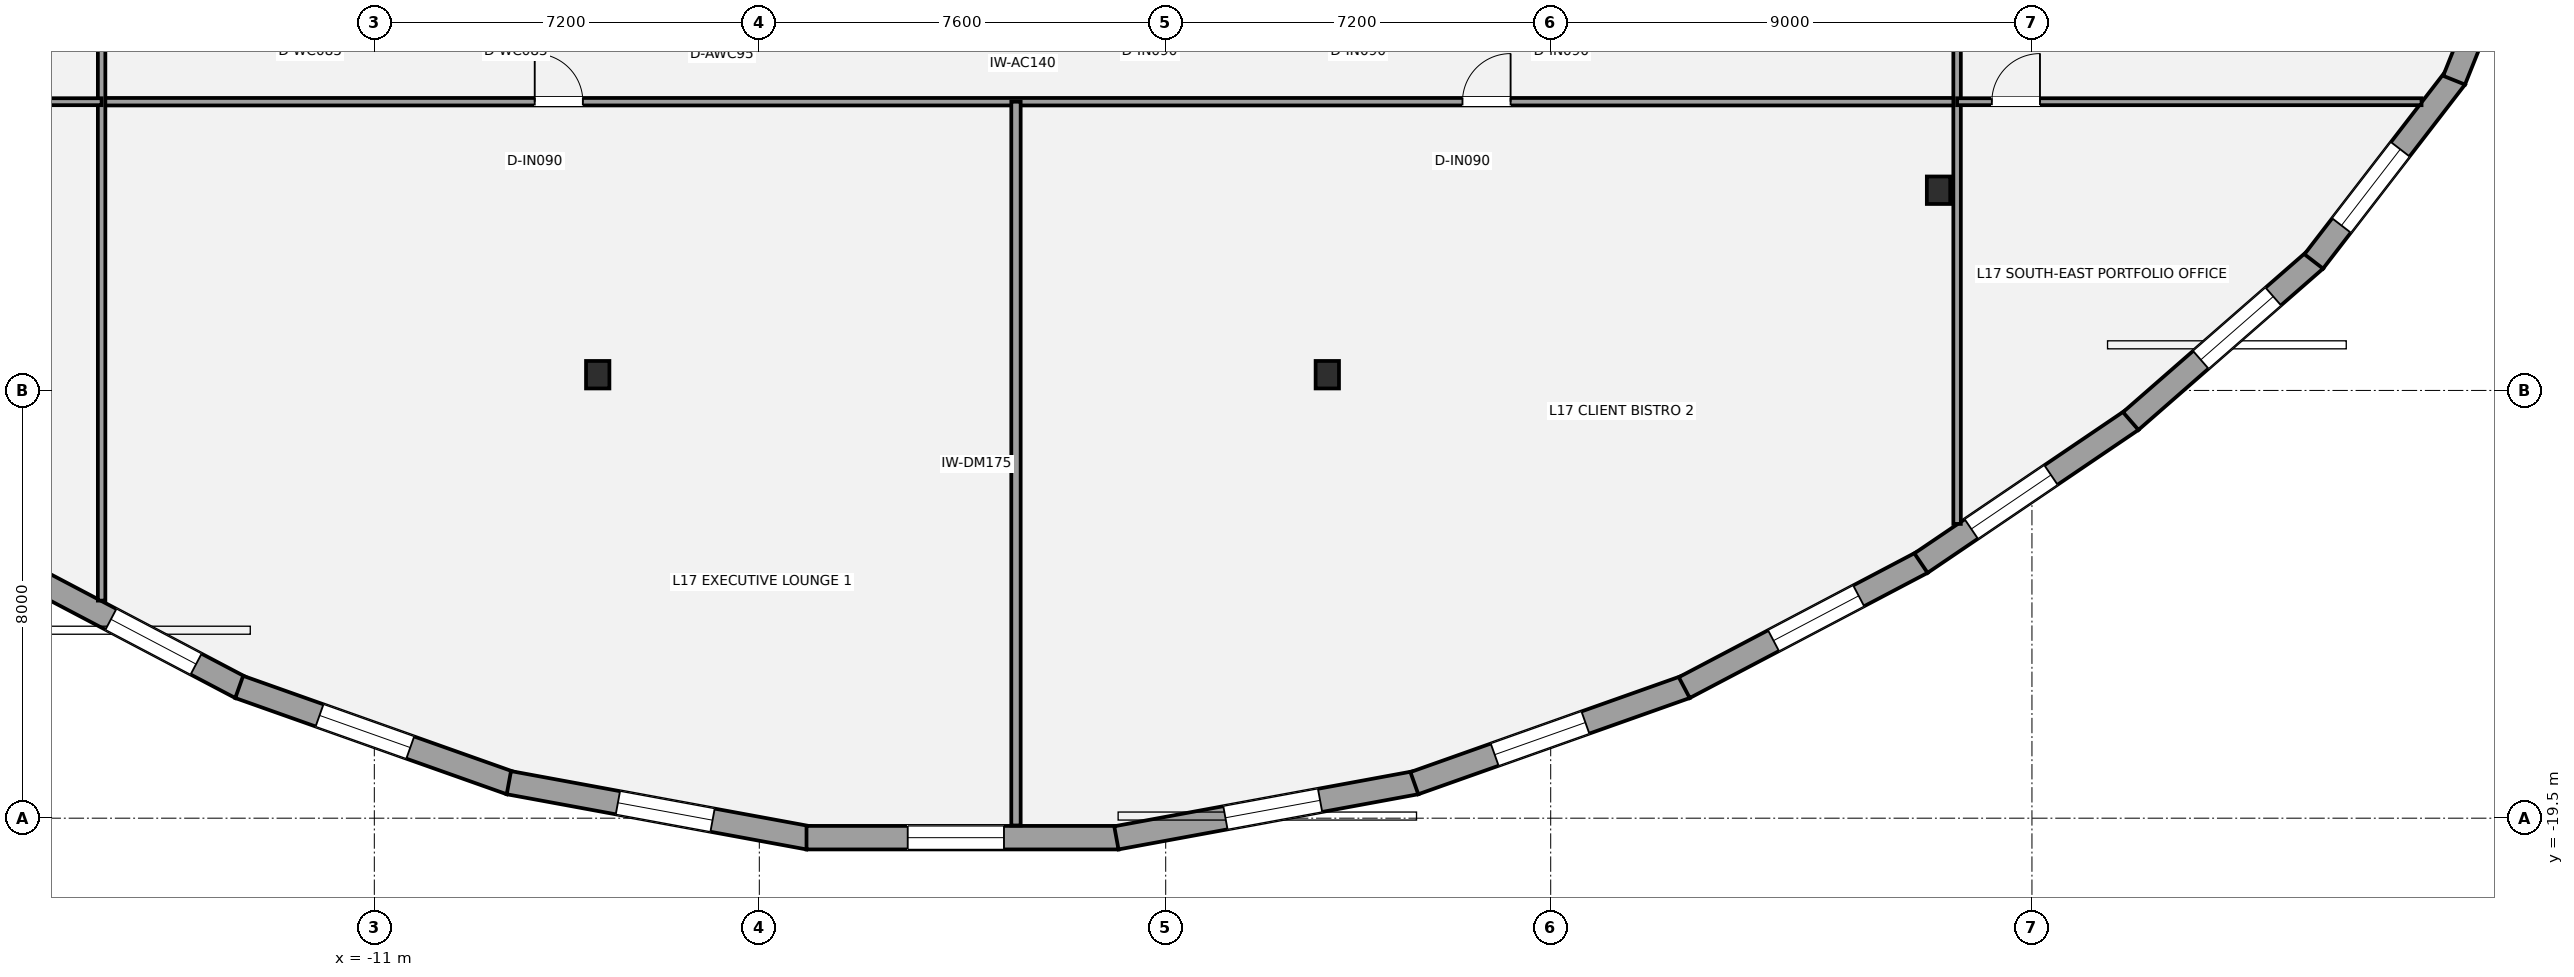
"""IFC4 building model, lengths in metres.
Left out: names, types, materials, properties, quantities, classifications, styles, units other than length and angle.
Written with IfcOpenShell. Run it as: python <this file> out.ifc"""

import sys

from ifc_helpers import new_model, si_unit, direction, frame, frame_2d, origin, origin_2d, place, context, subcontext, project, spatial, rectangle, i_section, extrude, element, fill, save


model = new_model("IFC4")
c1 = context("Model", 3, precision=1e-05, world=origin(), true_north=direction((0.0, 1.0)))
c2 = subcontext(c1, "Body", "Model", "MODEL_VIEW")
j1 = project(units=[si_unit("LENGTHUNIT", "METRE"), si_unit("PLANEANGLEUNIT", "RADIAN")], contexts=[c1])
p1 = place(None, origin())
s1 = spatial("IfcSite", under=j1, at=p1, CompositionType="ELEMENT")
p2 = place(p1, origin())
s2 = spatial("IfcBuilding", under=s1, at=p2, CompositionType="ELEMENT")
p3 = place(p2, frame((0.0, 0.0, 66.6)))
s3 = spatial("IfcBuildingStorey", under=s2, at=p3, CompositionType="ELEMENT", Elevation=66.6)
for number, where, z_axis, x_axis in (
    (1, (-6.822, -11.206, 0.0), (0.0, 0.0, 1.0), (1.0, 0.0, 0.0)),
    (2, (6.822, -11.206, 0.0), (0.0, 0.0, 1.0), (1.0, 0.0, 0.0)),
    (3, (18.253, -7.756, 0.0), (0.0, 0.0, 1.0), (1.0, 0.0, 0.0)),
):
    element("IfcColumn", number, at=place(p3, frame(where, z_axis=z_axis, x_axis=x_axis)), inside=s3, PredefinedType="COLUMN", context=c2, shape_type="SweptSolid", body=[
        extrude(i_section(OverallWidth=0.437, OverallDepth=0.514, WebThickness=0.061, FlangeThickness=0.097, at=origin_2d()), origin(), (0.0, 0.0, 1.0), 3.6),
    ])
p4 = place(p3, frame((-13.498, -17.058, 0.0), z_axis=(0.0, 0.0, 1.0), x_axis=(-0.884937186938, 0.465710398395, 0.0)))
e4 = element("IfcWall", 4, at=p4, inside=s3, PredefinedType="STANDARD", context=c2, shape_type="SweptSolid", body=[
    extrude(rectangle(XDim=5.026, YDim=0.44, at=frame_2d((2.513, 0.0))), origin(), (0.0, 0.0, 1.0), 2.529),
])
p5 = place(p4, frame((0.944, 0.0, 0.65)))
e5 = element("IfcOpeningElement", 5, at=p5, cuts=e4, PredefinedType="OPENING", context=c2, shape_type="SweptSolid", body=[
    extrude(rectangle(XDim=1.8, YDim=1.7, at=frame_2d((0.9, 0.85))), frame((0.0, 0.23, 0.0), z_axis=(0.0, -1.0, 0.0), x_axis=(1.0, 0.0, 0.0)), (0.0, 0.0, 1.0), 0.46),
])
p6 = place(p3, frame((-8.45, -18.845, 0.0), z_axis=(0.0, 0.0, 1.0), x_axis=(-0.942515730584, 0.334161783575, 0.0)))
e6 = element("IfcWall", 6, at=p6, inside=s3, PredefinedType="STANDARD", context=c2, shape_type="SweptSolid", body=[
    extrude(rectangle(XDim=5.386, YDim=0.44, at=frame_2d((2.693, 0.0))), origin(), (0.0, 0.0, 1.0), 2.529),
])
p7 = place(p6, frame((1.992, 0.0, 0.65)))
e7 = element("IfcOpeningElement", 7, at=p7, cuts=e6, PredefinedType="OPENING", context=c2, shape_type="SweptSolid", body=[
    extrude(rectangle(XDim=1.8, YDim=1.7, at=frame_2d((0.9, 0.85))), frame((0.0, 0.23, 0.0), z_axis=(0.0, -1.0, 0.0), x_axis=(1.0, 0.0, 0.0)), (0.0, 0.0, 1.0), 0.46),
])
p8 = place(p3, frame((-2.878, -19.868, 0.0), z_axis=(0.0, 0.0, 1.0), x_axis=(-0.983468646836, 0.181078493177, 0.0)))
e8 = element("IfcWall", 8, at=p8, inside=s3, PredefinedType="STANDARD", context=c2, shape_type="SweptSolid", body=[
    extrude(rectangle(XDim=5.7, YDim=0.44, at=frame_2d((2.85, 0.0))), origin(), (0.0, 0.0, 1.0), 2.529),
])
p9 = place(p8, frame((1.827, 0.0, 0.65)))
e9 = element("IfcOpeningElement", 9, at=p9, cuts=e8, PredefinedType="OPENING", context=c2, shape_type="SweptSolid", body=[
    extrude(rectangle(XDim=1.8, YDim=1.7, at=frame_2d((0.9, 0.85))), frame((0.0, 0.23, 0.0), z_axis=(0.0, -1.0, 0.0), x_axis=(1.0, 0.0, 0.0)), (0.0, 0.0, 1.0), 0.46),
])
p10 = place(p3, frame((2.917, -19.865, 0.0), z_axis=(0.0, 0.0, 1.0), x_axis=(-1.0, 0.0, 0.0)))
e10 = element("IfcWall", 10, at=p10, inside=s3, PredefinedType="STANDARD", context=c2, shape_type="SweptSolid", body=[
    extrude(rectangle(XDim=5.835, YDim=0.44, at=frame_2d((2.917, 0.0))), origin(), (0.0, 0.0, 1.0), 2.529),
])
p11 = place(p10, frame((2.142, 0.0, 0.65)))
e11 = element("IfcOpeningElement", 11, at=p11, cuts=e10, PredefinedType="OPENING", context=c2, shape_type="SweptSolid", body=[
    extrude(rectangle(XDim=1.8, YDim=1.7, at=frame_2d((0.9, 0.85))), frame((0.0, 0.23, 0.0), z_axis=(0.0, -1.0, 0.0), x_axis=(1.0, 0.0, 0.0)), (0.0, 0.0, 1.0), 0.46),
])
p12 = place(p3, frame((8.484, -18.836, 0.0), z_axis=(0.0, 0.0, 1.0), x_axis=(-0.983468646836, -0.181078493177, 0.0)))
e12 = element("IfcWall", 12, at=p12, inside=s3, PredefinedType="STANDARD", context=c2, shape_type="SweptSolid", body=[
    extrude(rectangle(XDim=5.7, YDim=0.44, at=frame_2d((2.85, 0.0))), origin(), (0.0, 0.0, 1.0), 2.529),
])
p13 = place(p12, frame((1.827, 0.0, 0.65)))
e13 = element("IfcOpeningElement", 13, at=p13, cuts=e12, PredefinedType="OPENING", context=c2, shape_type="SweptSolid", body=[
    extrude(rectangle(XDim=1.8, YDim=1.7, at=frame_2d((0.9, 0.85))), frame((0.0, 0.23, 0.0), z_axis=(0.0, -1.0, 0.0), x_axis=(1.0, 0.0, 0.0)), (0.0, 0.0, 1.0), 0.46),
])
p14 = place(p3, frame((13.527, -17.045, 0.0), z_axis=(0.0, 0.0, 1.0), x_axis=(-0.942515730584, -0.334161783575, 0.0)))
e14 = element("IfcWall", 14, at=p14, inside=s3, PredefinedType="STANDARD", context=c2, shape_type="SweptSolid", body=[
    extrude(rectangle(XDim=5.386, YDim=0.44, at=frame_2d((2.693, 0.0))), origin(), (0.0, 0.0, 1.0), 2.529),
])
p15 = place(p14, frame((1.992, 0.0, 0.65)))
e15 = element("IfcOpeningElement", 15, at=p15, cuts=e14, PredefinedType="OPENING", context=c2, shape_type="SweptSolid", body=[
    extrude(rectangle(XDim=1.8, YDim=1.7, at=frame_2d((0.9, 0.85))), frame((0.0, 0.23, 0.0), z_axis=(0.0, -1.0, 0.0), x_axis=(1.0, 0.0, 0.0)), (0.0, 0.0, 1.0), 0.46),
])
p16 = place(p3, frame((17.946, -14.717, 0.0), z_axis=(0.0, 0.0, 1.0), x_axis=(-0.884937186938, -0.465710398395, 0.0)))
e16 = element("IfcWall", 16, at=p16, inside=s3, PredefinedType="STANDARD", context=c2, shape_type="SweptSolid", body=[
    extrude(rectangle(XDim=5.026, YDim=0.44, at=frame_2d((2.513, 0.0))), origin(), (0.0, 0.0, 1.0), 2.529),
])
p17 = place(p16, frame((1.341, 0.0, 0.65)))
e17 = element("IfcOpeningElement", 17, at=p17, cuts=e16, PredefinedType="OPENING", context=c2, shape_type="SweptSolid", body=[
    extrude(rectangle(XDim=1.8, YDim=1.7, at=frame_2d((0.9, 0.85))), frame((0.0, 0.23, 0.0), z_axis=(0.0, -1.0, 0.0), x_axis=(1.0, 0.0, 0.0)), (0.0, 0.0, 1.0), 0.46),
])
p18 = place(p3, frame((21.868, -12.056, 0.0), z_axis=(0.0, 0.0, 1.0), x_axis=(-0.827689135004, -0.561186863528, 0.0)))
e18 = element("IfcWall", 18, at=p18, inside=s3, PredefinedType="STANDARD", context=c2, shape_type="SweptSolid", body=[
    extrude(rectangle(XDim=4.765, YDim=0.44, at=frame_2d((2.382, 0.0))), origin(), (0.0, 0.0, 1.0), 2.529),
])
p19 = place(p18, frame((1.828, 0.0, 0.65)))
e19 = element("IfcOpeningElement", 19, at=p19, cuts=e18, PredefinedType="OPENING", context=c2, shape_type="SweptSolid", body=[
    extrude(rectangle(XDim=1.8, YDim=1.7, at=frame_2d((0.9, 0.85))), frame((0.0, 0.23, 0.0), z_axis=(0.0, -1.0, 0.0), x_axis=(1.0, 0.0, 0.0)), (0.0, 0.0, 1.0), 0.46),
])
p20 = place(p3, frame((25.3, -9.056, 0.0), z_axis=(0.0, 0.0, 1.0), x_axis=(-0.753064762529, -0.657946398605, 0.0)))
e20 = element("IfcWall", 20, at=p20, inside=s3, PredefinedType="STANDARD", context=c2, shape_type="SweptSolid", body=[
    extrude(rectangle(XDim=4.584, YDim=0.44, at=frame_2d((2.292, 0.0))), origin(), (0.0, 0.0, 1.0), 2.529),
])
p21 = place(p20, frame((1.044, 0.0, 0.65)))
e21 = element("IfcOpeningElement", 21, at=p21, cuts=e20, PredefinedType="OPENING", context=c2, shape_type="SweptSolid", body=[
    extrude(rectangle(XDim=1.8, YDim=1.7, at=frame_2d((0.9, 0.85))), frame((0.0, 0.23, 0.0), z_axis=(0.0, -1.0, 0.0), x_axis=(1.0, 0.0, 0.0)), (0.0, 0.0, 1.0), 0.46),
])
p22 = place(p3, frame((27.925, -5.645, 0.0), z_axis=(0.0, 0.0, 1.0), x_axis=(-0.610684735824, -0.791873824187, 0.0)))
e22 = element("IfcWall", 22, at=p22, inside=s3, PredefinedType="STANDARD", context=c2, shape_type="SweptSolid", body=[
    extrude(rectangle(XDim=4.347, YDim=0.44, at=frame_2d((2.173, 0.0))), origin(), (0.0, 0.0, 1.0), 2.529),
])
p23 = place(p22, frame((1.698, 0.0, 0.65)))
e23 = element("IfcOpeningElement", 23, at=p23, cuts=e22, PredefinedType="OPENING", context=c2, shape_type="SweptSolid", body=[
    extrude(rectangle(XDim=1.8, YDim=1.7, at=frame_2d((0.9, 0.85))), frame((0.0, 0.23, 0.0), z_axis=(0.0, -1.0, 0.0), x_axis=(1.0, 0.0, 0.0)), (0.0, 0.0, 1.0), 0.46),
])
p24 = place(p3, frame((29.417, -1.896, 0.0), z_axis=(0.0, 0.0, 1.0), x_axis=(-0.37175044344, -0.928332703185, 0.0)))
e24 = element("IfcWall", 24, at=p24, inside=s3, PredefinedType="STANDARD", context=c2, shape_type="SweptSolid", body=[
    extrude(rectangle(XDim=4.095, YDim=0.44, at=frame_2d((2.047, 0.0))), origin(), (0.0, 0.0, 1.0), 2.529),
])
p25 = place(p24, frame((0.649, 0.0, 0.65)))
e25 = element("IfcOpeningElement", 25, at=p25, cuts=e24, PredefinedType="OPENING", context=c2, shape_type="SweptSolid", body=[
    extrude(rectangle(XDim=1.8, YDim=1.7, at=frame_2d((0.9, 0.85))), frame((0.0, 0.23, 0.0), z_axis=(0.0, -1.0, 0.0), x_axis=(1.0, 0.0, 0.0)), (0.0, 0.0, 1.0), 0.46),
])
p26 = place(p3, frame((-16.1, -6.1, 0.0), z_axis=(0.0, 0.0, 1.0), x_axis=(1.0, 0.0, 0.0)))
e26 = element("IfcWall", 26, at=p26, inside=s3, PredefinedType="PARTITIONING", context=c2, shape_type="SweptSolid", body=[
    extrude(rectangle(XDim=34.7, YDim=0.14, at=frame_2d((17.35, 0.0))), origin(), (0.0, 0.0, 1.0), 2.853),
])
p27 = place(p26, frame((8.1, 0.0, 0.0)))
e27 = element("IfcOpeningElement", 27, at=p27, cuts=e26, PredefinedType="OPENING", context=c2, shape_type="SweptSolid", body=[
    extrude(rectangle(XDim=0.9, YDim=2.1, at=frame_2d((0.45, 1.05))), frame((0.0, 0.08, 0.0), z_axis=(0.0, -1.0, 0.0), x_axis=(1.0, 0.0, 0.0)), (0.0, 0.0, 1.0), 0.16),
])
p28 = place(p26, frame((25.45, 0.0, 0.0)))
e28 = element("IfcOpeningElement", 28, at=p28, cuts=e26, PredefinedType="OPENING", context=c2, shape_type="SweptSolid", body=[
    extrude(rectangle(XDim=0.9, YDim=2.1, at=frame_2d((0.45, 1.05))), frame((0.0, 0.08, 0.0), z_axis=(0.0, -1.0, 0.0), x_axis=(1.0, 0.0, 0.0)), (0.0, 0.0, 1.0), 0.16),
])
p29 = place(p3, frame((-16.1, -15.431, 0.0), z_axis=(0.0, 0.0, 1.0), x_axis=(0.0, 1.0, 0.0)))
e29 = element("IfcWall", 29, at=p29, inside=s3, PredefinedType="PARTITIONING", context=c2, shape_type="SweptSolid", body=[
    extrude(rectangle(XDim=21.281, YDim=0.14, at=frame_2d((10.641, 0.0))), origin(), (0.0, 0.0, 1.0), 2.841),
])
p30 = place(p29, frame((12.531, 0.0, 0.0)))
e30 = element("IfcOpeningElement", 30, at=p30, cuts=e29, PredefinedType="OPENING", context=c2, shape_type="SweptSolid", body=[
    extrude(rectangle(XDim=0.9, YDim=2.1, at=frame_2d((0.45, 1.05))), frame((0.0, 0.08, 0.0), z_axis=(0.0, -1.0, 0.0), x_axis=(1.0, 0.0, 0.0)), (0.0, 0.0, 1.0), 0.16),
])
p31 = place(p29, frame((18.506, 0.0, 0.0)))
e31 = element("IfcOpeningElement", 31, at=p31, cuts=e29, PredefinedType="OPENING", context=c2, shape_type="SweptSolid", body=[
    extrude(rectangle(XDim=0.9, YDim=2.1, at=frame_2d((0.45, 1.05))), frame((0.0, 0.08, 0.0), z_axis=(0.0, -1.0, 0.0), x_axis=(1.0, 0.0, 0.0)), (0.0, 0.0, 1.0), 0.16),
])
p32 = place(p3, frame((18.6, -13.996, 0.0), z_axis=(0.0, 0.0, 1.0), x_axis=(0.0, 1.0, 0.0)))
e32 = element("IfcWall", 32, at=p32, inside=s3, PredefinedType="PARTITIONING", context=c2, shape_type="SweptSolid", body=[
    extrude(rectangle(XDim=19.846, YDim=0.14, at=frame_2d((9.923, 0.0))), origin(), (0.0, 0.0, 1.0), 2.779),
])
p33 = place(p32, frame((9.396, 0.0, 0.0)))
e33 = element("IfcOpeningElement", 33, at=p33, cuts=e32, PredefinedType="OPENING", context=c2, shape_type="SweptSolid", body=[
    extrude(rectangle(XDim=0.9, YDim=2.1, at=frame_2d((0.45, 1.05))), frame((0.0, 0.08, 0.0), z_axis=(0.0, -1.0, 0.0), x_axis=(1.0, 0.0, 0.0)), (0.0, 0.0, 1.0), 0.16),
])
p34 = place(p32, frame((13.646, 0.0, 0.0)))
e34 = element("IfcOpeningElement", 34, at=p34, cuts=e32, PredefinedType="OPENING", context=c2, shape_type="SweptSolid", body=[
    extrude(rectangle(XDim=0.9, YDim=2.1, at=frame_2d((0.45, 1.05))), frame((0.0, 0.08, 0.0), z_axis=(0.0, -1.0, 0.0), x_axis=(1.0, 0.0, 0.0)), (0.0, 0.0, 1.0), 0.16),
])
p35 = place(p32, frame((17.671, 0.0, 0.0)))
e35 = element("IfcOpeningElement", 35, at=p35, cuts=e32, PredefinedType="OPENING", context=c2, shape_type="SweptSolid", body=[
    extrude(rectangle(XDim=0.9, YDim=2.1, at=frame_2d((0.45, 1.05))), frame((0.0, 0.08, 0.0), z_axis=(0.0, -1.0, 0.0), x_axis=(1.0, 0.0, 0.0)), (0.0, 0.0, 1.0), 0.16),
])
p36 = place(p3, frame((1.0, -19.636, 0.0), z_axis=(0.0, 0.0, 1.0), x_axis=(0.0, 1.0, 0.0)))
e36 = element("IfcWall", 36, at=p36, inside=s3, PredefinedType="PARTITIONING", context=c2, shape_type="SweptSolid", body=[
    extrude(rectangle(XDim=13.536, YDim=0.175, at=frame_2d((6.768, 0.0))), origin(), (0.0, 0.0, 1.0), 3.4),
])
p37 = place(p3, frame((-27.286, -6.1, 0.0), z_axis=(0.0, 0.0, 1.0), x_axis=(1.0, 0.0, 0.0)))
e37 = element("IfcWall", 37, at=p37, inside=s3, PredefinedType="PARTITIONING", context=c2, shape_type="SweptSolid", body=[
    extrude(rectangle(XDim=11.186, YDim=0.13, at=frame_2d((5.593, 0.0))), origin(), (0.0, 0.0, 1.0), 2.779),
])
p38 = place(p37, frame((0.75, 0.0, 0.0)))
e38 = element("IfcOpeningElement", 38, at=p38, cuts=e37, PredefinedType="OPENING", context=c2, shape_type="SweptSolid", body=[
    extrude(rectangle(XDim=0.9, YDim=2.1, at=frame_2d((0.45, 1.05))), frame((0.0, 0.075, 0.0), z_axis=(0.0, -1.0, 0.0), x_axis=(1.0, 0.0, 0.0)), (0.0, 0.0, 1.0), 0.15),
])
p39 = place(p3, frame((18.6, -6.1, 0.0), z_axis=(0.0, 0.0, 1.0), x_axis=(1.0, 0.0, 0.0)))
e39 = element("IfcWall", 39, at=p39, inside=s3, PredefinedType="PARTITIONING", context=c2, shape_type="SweptSolid", body=[
    extrude(rectangle(XDim=8.686, YDim=0.13, at=frame_2d((4.343, 0.0))), origin(), (0.0, 0.0, 1.0), 2.779),
])
p40 = place(p39, frame((0.65, 0.0, 0.0)))
e40 = element("IfcOpeningElement", 40, at=p40, cuts=e39, PredefinedType="OPENING", context=c2, shape_type="SweptSolid", body=[
    extrude(rectangle(XDim=0.9, YDim=2.1, at=frame_2d((0.45, 1.05))), frame((0.0, 0.075, 0.0), z_axis=(0.0, -1.0, 0.0), x_axis=(1.0, 0.0, 0.0)), (0.0, 0.0, 1.0), 0.15),
])
p41 = place(p5, origin())
e41 = element("IfcWindow", 41, at=p41, inside=s3, PartitioningType="SINGLE_PANEL", PredefinedType="WINDOW", context=c2, shape_type="SweptSolid", body=[
    extrude(rectangle(XDim=1.8, YDim=1.7, at=frame_2d((0.9, 0.85))), frame((0.0, -0.01, 0.0), z_axis=(0.0, -1.0, 0.0), x_axis=(1.0, 0.0, 0.0)), (0.0, 0.0, 1.0), 0.06),
])
fill(e5, e41)
p42 = place(p7, origin())
e42 = element("IfcWindow", 42, at=p42, inside=s3, PartitioningType="SINGLE_PANEL", PredefinedType="WINDOW", context=c2, shape_type="SweptSolid", body=[
    extrude(rectangle(XDim=1.8, YDim=1.7, at=frame_2d((0.9, 0.85))), frame((0.0, -0.01, 0.0), z_axis=(0.0, -1.0, 0.0), x_axis=(1.0, 0.0, 0.0)), (0.0, 0.0, 1.0), 0.06),
])
fill(e7, e42)
p43 = place(p9, origin())
e43 = element("IfcWindow", 43, at=p43, inside=s3, PartitioningType="SINGLE_PANEL", PredefinedType="WINDOW", context=c2, shape_type="SweptSolid", body=[
    extrude(rectangle(XDim=1.8, YDim=1.7, at=frame_2d((0.9, 0.85))), frame((0.0, -0.01, 0.0), z_axis=(0.0, -1.0, 0.0), x_axis=(1.0, 0.0, 0.0)), (0.0, 0.0, 1.0), 0.06),
])
fill(e9, e43)
p44 = place(p11, origin())
e44 = element("IfcWindow", 44, at=p44, inside=s3, PartitioningType="SINGLE_PANEL", PredefinedType="WINDOW", context=c2, shape_type="SweptSolid", body=[
    extrude(rectangle(XDim=1.8, YDim=1.7, at=frame_2d((0.9, 0.85))), frame((0.0, -0.01, 0.0), z_axis=(0.0, -1.0, 0.0), x_axis=(1.0, 0.0, 0.0)), (0.0, 0.0, 1.0), 0.06),
])
fill(e11, e44)
p45 = place(p13, origin())
e45 = element("IfcWindow", 45, at=p45, inside=s3, PartitioningType="SINGLE_PANEL", PredefinedType="WINDOW", context=c2, shape_type="SweptSolid", body=[
    extrude(rectangle(XDim=1.8, YDim=1.7, at=frame_2d((0.9, 0.85))), frame((0.0, -0.01, 0.0), z_axis=(0.0, -1.0, 0.0), x_axis=(1.0, 0.0, 0.0)), (0.0, 0.0, 1.0), 0.06),
])
fill(e13, e45)
p46 = place(p15, origin())
e46 = element("IfcWindow", 46, at=p46, inside=s3, PartitioningType="SINGLE_PANEL", PredefinedType="WINDOW", context=c2, shape_type="SweptSolid", body=[
    extrude(rectangle(XDim=1.8, YDim=1.7, at=frame_2d((0.9, 0.85))), frame((0.0, -0.01, 0.0), z_axis=(0.0, -1.0, 0.0), x_axis=(1.0, 0.0, 0.0)), (0.0, 0.0, 1.0), 0.06),
])
fill(e15, e46)
p47 = place(p17, origin())
e47 = element("IfcWindow", 47, at=p47, inside=s3, PartitioningType="SINGLE_PANEL", PredefinedType="WINDOW", context=c2, shape_type="SweptSolid", body=[
    extrude(rectangle(XDim=1.8, YDim=1.7, at=frame_2d((0.9, 0.85))), frame((0.0, -0.01, 0.0), z_axis=(0.0, -1.0, 0.0), x_axis=(1.0, 0.0, 0.0)), (0.0, 0.0, 1.0), 0.06),
])
fill(e17, e47)
p48 = place(p19, origin())
e48 = element("IfcWindow", 48, at=p48, inside=s3, PartitioningType="SINGLE_PANEL", PredefinedType="WINDOW", context=c2, shape_type="SweptSolid", body=[
    extrude(rectangle(XDim=1.8, YDim=1.7, at=frame_2d((0.9, 0.85))), frame((0.0, -0.01, 0.0), z_axis=(0.0, -1.0, 0.0), x_axis=(1.0, 0.0, 0.0)), (0.0, 0.0, 1.0), 0.06),
])
fill(e19, e48)
p49 = place(p21, origin())
e49 = element("IfcWindow", 49, at=p49, inside=s3, PartitioningType="SINGLE_PANEL", PredefinedType="WINDOW", context=c2, shape_type="SweptSolid", body=[
    extrude(rectangle(XDim=1.8, YDim=1.7, at=frame_2d((0.9, 0.85))), frame((0.0, -0.01, 0.0), z_axis=(0.0, -1.0, 0.0), x_axis=(1.0, 0.0, 0.0)), (0.0, 0.0, 1.0), 0.06),
])
fill(e21, e49)
p50 = place(p23, origin())
e50 = element("IfcWindow", 50, at=p50, inside=s3, PartitioningType="SINGLE_PANEL", PredefinedType="WINDOW", context=c2, shape_type="SweptSolid", body=[
    extrude(rectangle(XDim=1.8, YDim=1.7, at=frame_2d((0.9, 0.85))), frame((0.0, -0.01, 0.0), z_axis=(0.0, -1.0, 0.0), x_axis=(1.0, 0.0, 0.0)), (0.0, 0.0, 1.0), 0.06),
])
fill(e23, e50)
p51 = place(p27, origin())
e51 = element("IfcDoor", 51, at=p51, inside=s3, OperationType="SINGLE_SWING_LEFT", PredefinedType="DOOR", context=c2, shape_type="SweptSolid", body=[
    extrude(rectangle(XDim=0.9, YDim=2.1, at=frame_2d((0.45, 1.05))), frame((0.0, 0.025, 0.0), z_axis=(0.0, -1.0, 0.0), x_axis=(1.0, 0.0, 0.0)), (0.0, 0.0, 1.0), 0.05),
])
fill(e27, e51)
p52 = place(p28, origin())
e52 = element("IfcDoor", 52, at=p52, inside=s3, OperationType="SINGLE_SWING_RIGHT", PredefinedType="DOOR", context=c2, shape_type="SweptSolid", body=[
    extrude(rectangle(XDim=0.9, YDim=2.1, at=frame_2d((0.45, 1.05))), frame((0.0, 0.025, 0.0), z_axis=(0.0, -1.0, 0.0), x_axis=(1.0, 0.0, 0.0)), (0.0, 0.0, 1.0), 0.05),
])
fill(e28, e52)
p53 = place(p40, origin())
e53 = element("IfcDoor", 53, at=p53, inside=s3, OperationType="SINGLE_SWING_RIGHT", PredefinedType="DOOR", context=c2, shape_type="SweptSolid", body=[
    extrude(rectangle(XDim=0.9, YDim=2.1, at=frame_2d((0.45, 1.05))), frame((0.0, 0.025, 0.0), z_axis=(0.0, -1.0, 0.0), x_axis=(1.0, 0.0, 0.0)), (0.0, 0.0, 1.0), 0.05),
])
fill(e40, e53)
save(model, sys.argv[1])
